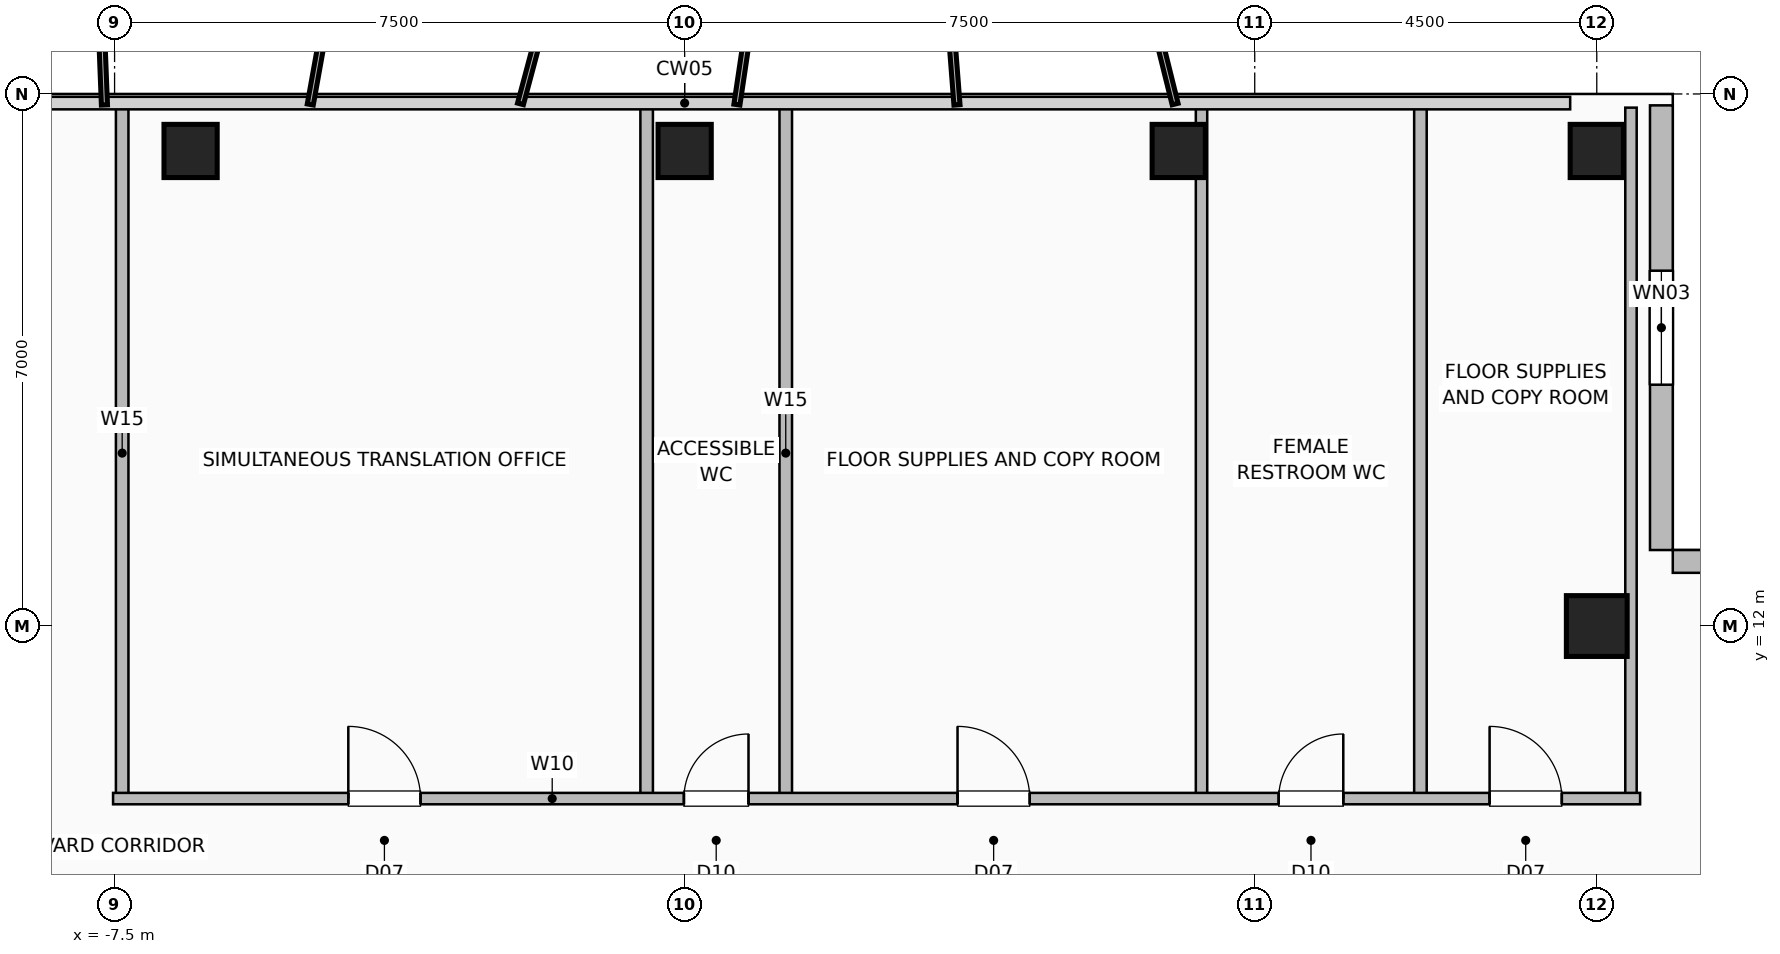
"""IFC4 building model, lengths in metres.
Left out: names, types, materials, properties, quantities, classifications, styles, units other than length and angle.
Written with IfcOpenShell. Run it as: python <this file> out.ifc"""

import sys

from ifc_helpers import new_model, si_unit, direction, frame, frame_2d, origin, origin_2d, place, context, subcontext, project, spatial, rectangle, hollow_rectangle, extrude, element, fill, save


model = new_model("IFC4")
c1 = context("Model", 3, precision=1e-05, world=origin(), true_north=direction((0.0, 1.0)))
c2 = subcontext(c1, "Body", "Model", "MODEL_VIEW")
j1 = project(units=[si_unit("LENGTHUNIT", "METRE"), si_unit("PLANEANGLEUNIT", "RADIAN")], contexts=[c1])
p1 = place(None, origin())
s1 = spatial("IfcSite", under=j1, at=p1, CompositionType="ELEMENT")
p2 = place(p1, origin())
s2 = spatial("IfcBuilding", under=s1, at=p2, CompositionType="ELEMENT")
p3 = place(p2, frame((0.0, 0.0, 250.4)))
s3 = spatial("IfcBuildingStorey", under=s2, at=p3, CompositionType="ELEMENT", Elevation=250.4)
for number, where, z_axis, x_axis in (
    (1, (-6.5, 18.25, 0.0), (0.0, 0.0, 1.0), (1.0, 0.0, 0.0)),
    (2, (0.0, 18.25, 0.0), (0.0, 0.0, 1.0), (1.0, 0.0, 0.0)),
    (3, (6.5, 18.25, 0.0), (0.0, 0.0, 1.0), (1.0, 0.0, 0.0)),
    (4, (12.0, 18.25, 0.0), (0.0, 0.0, 1.0), (1.0, 0.0, 0.0)),
):
    element("IfcColumn", number, at=place(p3, frame(where, z_axis=z_axis, x_axis=x_axis)), inside=s3, PredefinedType="COLUMN", context=c2, shape_type="SweptSolid", body=[
        extrude(hollow_rectangle(XDim=0.7, YDim=0.7, WallThickness=0.035, at=origin_2d()), origin(), (0.0, 0.0, 1.0), 3.6),
    ])
p4 = place(p3, frame((12.0, 12.0, 0.0), z_axis=(0.0, 0.0, 1.0), x_axis=(1.0, 0.0, 0.0)))
e5 = element("IfcColumn", 5, at=p4, inside=s3, PredefinedType="COLUMN", context=c2, shape_type="SweptSolid", body=[
    extrude(hollow_rectangle(XDim=0.8, YDim=0.8, WallThickness=0.04, at=origin_2d()), origin(), (0.0, 0.0, 1.0), 3.6),
])
p5 = place(p3, frame((12.85, 18.85, 0.0), z_axis=(0.0, 0.0, 1.0), x_axis=(0.0, -1.0, 0.0)))
e6 = element("IfcWall", 6, at=p5, inside=s3, PredefinedType="SOLIDWALL", context=c2, shape_type="SweptSolid", body=[
    extrude(rectangle(XDim=5.85, YDim=0.3, at=frame_2d((2.925, 0.0))), origin(), (0.0, 0.0, 1.0), 3.36),
])
p6 = place(p5, frame((2.175, 0.0, 0.9)))
e7 = element("IfcOpeningElement", 7, at=p6, cuts=e6, PredefinedType="OPENING", context=c2, shape_type="SweptSolid", body=[
    extrude(rectangle(XDim=1.5, YDim=1.8, at=frame_2d((0.75, 0.9))), frame((0.0, 0.16, 0.0), z_axis=(0.0, -1.0, 0.0), x_axis=(1.0, 0.0, 0.0)), (0.0, 0.0, 1.0), 0.32),
])
p7 = place(p3, frame((18.85, 12.85, 0.0), z_axis=(0.0, 0.0, 1.0), x_axis=(-1.0, 0.0, 0.0)))
e8 = element("IfcWall", 8, at=p7, inside=s3, PredefinedType="SOLIDWALL", context=c2, shape_type="SweptSolid", body=[
    extrude(rectangle(XDim=5.85, YDim=0.3, at=frame_2d((2.925, 0.0))), origin(), (0.0, 0.0, 1.0), 3.36),
])
for number, where, z_axis, x_axis in (
    (9, (1.33, 9.73, 0.0), (0.0, 0.0, 1.0), (0.0, 1.0, 0.0)),
    (10, (9.68, 9.73, 0.0), (0.0, 0.0, 1.0), (0.0, 1.0, 0.0)),
    (11, (-7.4, 9.73, 0.0), (0.0, 0.0, 1.0), (0.0, 1.0, 0.0)),
    (12, (-0.5, 9.73, 0.0), (0.0, 0.0, 1.0), (0.0, 1.0, 0.0)),
):
    element("IfcWall", number, at=place(p3, frame(where, z_axis=z_axis, x_axis=x_axis)), inside=s3, PredefinedType="PLUMBINGWALL", context=c2, shape_type="SweptSolid", body=[
        extrude(rectangle(XDim=9.09, YDim=0.165, at=frame_2d((4.545, 0.0))), origin(), (0.0, 0.0, 1.0), 3.36),
    ])
for number, where, z_axis, x_axis in (
    (13, (6.8, 9.73, 0.0), (0.0, 0.0, 1.0), (0.0, 1.0, 0.0)),
    (14, (12.45, 9.73, 0.0), (0.0, 0.0, 1.0), (0.0, 1.0, 0.0)),
):
    element("IfcWall", number, at=place(p3, frame(where, z_axis=z_axis, x_axis=x_axis)), inside=s3, PredefinedType="PARTITIONING", context=c2, shape_type="SweptSolid", body=[
        extrude(rectangle(XDim=9.09, YDim=0.15, at=frame_2d((4.545, 0.0))), origin(), (0.0, 0.0, 1.0), 3.36),
    ])
p8 = place(p3, frame((-7.52, 9.73, 0.0), z_axis=(0.0, 0.0, 1.0), x_axis=(1.0, 0.0, 0.0)))
e15 = element("IfcWall", 15, at=p8, inside=s3, PredefinedType="PARTITIONING", context=c2, shape_type="SweptSolid", body=[
    extrude(rectangle(XDim=20.09, YDim=0.15, at=frame_2d((10.045, 0.0))), origin(), (0.0, 0.0, 1.0), 3.36),
])
p9 = place(p8, frame((3.095, 0.0, 0.0)))
e16 = element("IfcOpeningElement", 16, at=p9, cuts=e15, PredefinedType="OPENING", context=c2, shape_type="SweptSolid", body=[
    extrude(rectangle(XDim=0.95, YDim=2.06, at=frame_2d((0.475, 1.03))), frame((0.0, 0.085, 0.0), z_axis=(0.0, -1.0, 0.0), x_axis=(1.0, 0.0, 0.0)), (0.0, 0.0, 1.0), 0.17),
])
p10 = place(p8, frame((7.51, 0.0, 0.0)))
e17 = element("IfcOpeningElement", 17, at=p10, cuts=e15, PredefinedType="OPENING", context=c2, shape_type="SweptSolid", body=[
    extrude(rectangle(XDim=0.85, YDim=2.05, at=frame_2d((0.425, 1.025))), frame((0.0, 0.085, 0.0), z_axis=(0.0, -1.0, 0.0), x_axis=(1.0, 0.0, 0.0)), (0.0, 0.0, 1.0), 0.17),
])
p11 = place(p8, frame((11.11, 0.0, 0.0)))
e18 = element("IfcOpeningElement", 18, at=p11, cuts=e15, PredefinedType="OPENING", context=c2, shape_type="SweptSolid", body=[
    extrude(rectangle(XDim=0.95, YDim=2.06, at=frame_2d((0.475, 1.03))), frame((0.0, 0.085, 0.0), z_axis=(0.0, -1.0, 0.0), x_axis=(1.0, 0.0, 0.0)), (0.0, 0.0, 1.0), 0.17),
])
p12 = place(p8, frame((15.335, 0.0, 0.0)))
e19 = element("IfcOpeningElement", 19, at=p12, cuts=e15, PredefinedType="OPENING", context=c2, shape_type="SweptSolid", body=[
    extrude(rectangle(XDim=0.85, YDim=2.05, at=frame_2d((0.425, 1.025))), frame((0.0, 0.085, 0.0), z_axis=(0.0, -1.0, 0.0), x_axis=(1.0, 0.0, 0.0)), (0.0, 0.0, 1.0), 0.17),
])
p13 = place(p8, frame((18.11, 0.0, 0.0)))
e20 = element("IfcOpeningElement", 20, at=p13, cuts=e15, PredefinedType="OPENING", context=c2, shape_type="SweptSolid", body=[
    extrude(rectangle(XDim=0.95, YDim=2.06, at=frame_2d((0.475, 1.03))), frame((0.0, 0.085, 0.0), z_axis=(0.0, -1.0, 0.0), x_axis=(1.0, 0.0, 0.0)), (0.0, 0.0, 1.0), 0.17),
])
p14 = place(p6, origin())
e21 = element("IfcWindow", 21, at=p14, inside=s3, PartitioningType="SINGLE_PANEL", PredefinedType="WINDOW", context=c2, shape_type="SweptSolid", body=[
    extrude(rectangle(XDim=1.5, YDim=1.8, at=frame_2d((0.75, 0.9))), frame((0.0, 0.03, 0.0), z_axis=(0.0, -1.0, 0.0), x_axis=(1.0, 0.0, 0.0)), (0.0, 0.0, 1.0), 0.06),
])
fill(e7, e21)
p15 = place(p9, origin())
e22 = element("IfcDoor", 22, at=p15, inside=s3, OperationType="SINGLE_SWING_LEFT", PredefinedType="DOOR", context=c2, shape_type="SweptSolid", body=[
    extrude(rectangle(XDim=0.95, YDim=2.06, at=frame_2d((0.475, 1.03))), frame((0.0, 0.025, 0.0), z_axis=(0.0, -1.0, 0.0), x_axis=(1.0, 0.0, 0.0)), (0.0, 0.0, 1.0), 0.05),
])
fill(e16, e22)
p16 = place(p10, origin())
e23 = element("IfcDoor", 23, at=p16, inside=s3, OperationType="SINGLE_SWING_RIGHT", PredefinedType="DOOR", context=c2, shape_type="SweptSolid", body=[
    extrude(rectangle(XDim=0.85, YDim=2.05, at=frame_2d((0.425, 1.025))), frame((0.0, 0.025, 0.0), z_axis=(0.0, -1.0, 0.0), x_axis=(1.0, 0.0, 0.0)), (0.0, 0.0, 1.0), 0.05),
])
fill(e17, e23)
p17 = place(p11, origin())
e24 = element("IfcDoor", 24, at=p17, inside=s3, OperationType="SINGLE_SWING_LEFT", PredefinedType="DOOR", context=c2, shape_type="SweptSolid", body=[
    extrude(rectangle(XDim=0.95, YDim=2.06, at=frame_2d((0.475, 1.03))), frame((0.0, 0.025, 0.0), z_axis=(0.0, -1.0, 0.0), x_axis=(1.0, 0.0, 0.0)), (0.0, 0.0, 1.0), 0.05),
])
fill(e18, e24)
p18 = place(p12, origin())
e25 = element("IfcDoor", 25, at=p18, inside=s3, OperationType="SINGLE_SWING_RIGHT", PredefinedType="DOOR", context=c2, shape_type="SweptSolid", body=[
    extrude(rectangle(XDim=0.85, YDim=2.05, at=frame_2d((0.425, 1.025))), frame((0.0, 0.025, 0.0), z_axis=(0.0, -1.0, 0.0), x_axis=(1.0, 0.0, 0.0)), (0.0, 0.0, 1.0), 0.05),
])
fill(e19, e25)
p19 = place(p13, origin())
e26 = element("IfcDoor", 26, at=p19, inside=s3, OperationType="SINGLE_SWING_LEFT", PredefinedType="DOOR", context=c2, shape_type="SweptSolid", body=[
    extrude(rectangle(XDim=0.95, YDim=2.06, at=frame_2d((0.475, 1.03))), frame((0.0, 0.025, 0.0), z_axis=(0.0, -1.0, 0.0), x_axis=(1.0, 0.0, 0.0)), (0.0, 0.0, 1.0), 0.05),
])
fill(e20, e26)
save(model, sys.argv[1])
